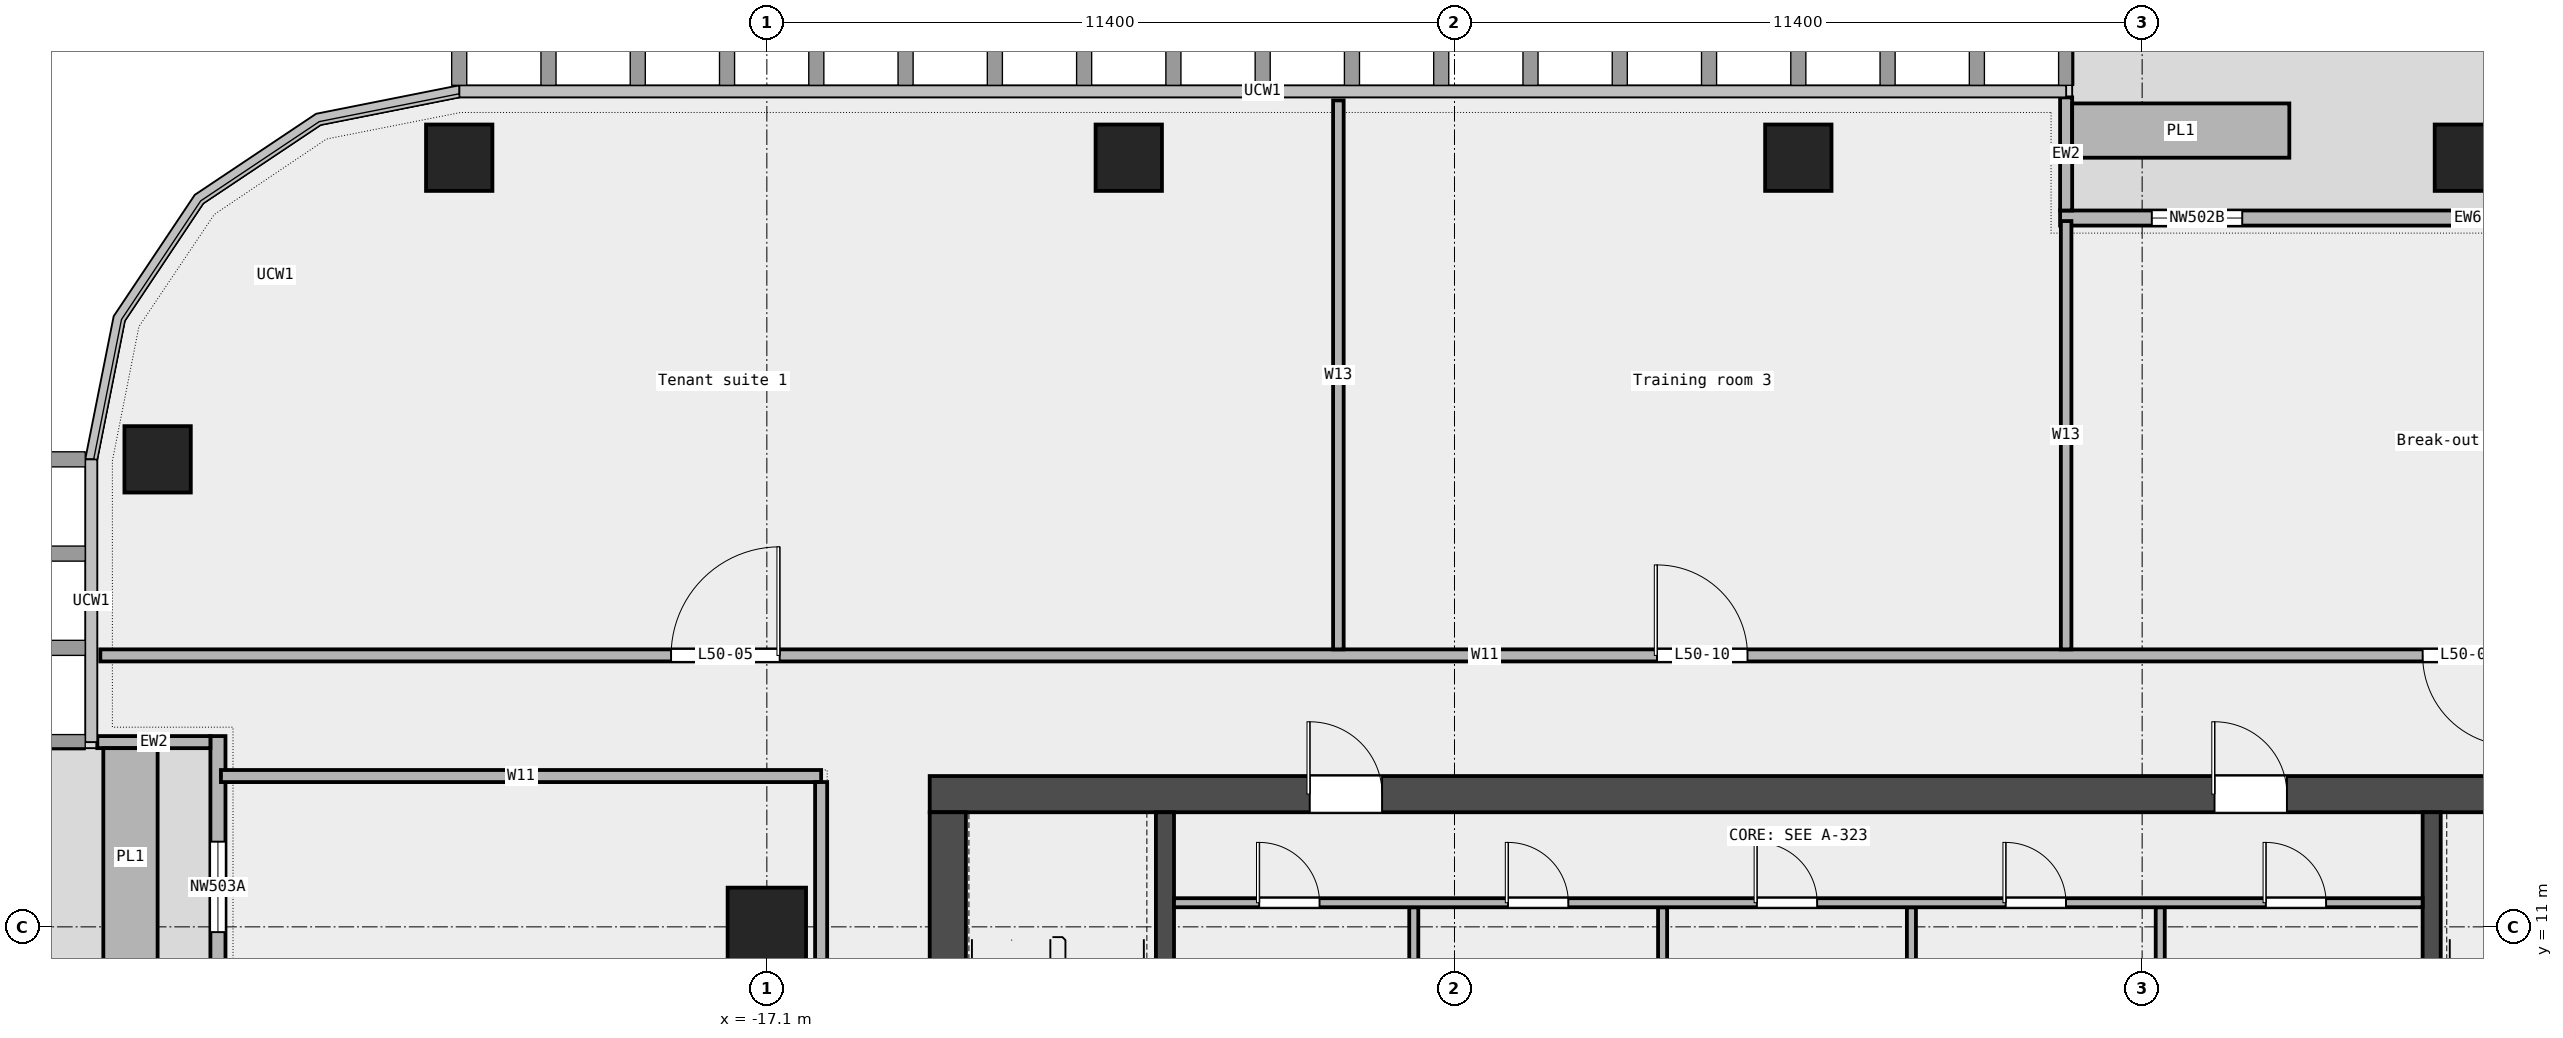
"""IFC4 building model, lengths in metres.
Left out: names, types, materials, properties, quantities, classifications, styles, units other than length and angle.
Written with IfcOpenShell. Run it as: python <this file> out.ifc"""

import sys

from ifc_helpers import new_model, si_unit, direction, frame, frame_2d, origin, origin_2d, place, context, subcontext, project, spatial, rectangle, extrude, element, fill, save


model = new_model("IFC4")
c1 = context("Model", 3, precision=1e-05, world=origin(), true_north=direction((0.0, 1.0)))
c2 = subcontext(c1, "Body", "Model", "MODEL_VIEW")
j1 = project(units=[si_unit("LENGTHUNIT", "METRE"), si_unit("PLANEANGLEUNIT", "RADIAN")], contexts=[c1])
p1 = place(None, origin())
s1 = spatial("IfcSite", under=j1, at=p1, CompositionType="ELEMENT")
p2 = place(p1, origin())
s2 = spatial("IfcBuilding", under=s1, at=p2, CompositionType="ELEMENT")
p3 = place(p2, frame((0.0, 0.0, 235.0)))
s3 = spatial("IfcBuildingStorey", under=s2, at=p3, CompositionType="ELEMENT", Elevation=235.0)
for number, where, z_axis, x_axis in (
    (1, (11.1, 23.75, 0.0), (0.0, 0.0, 1.0), (1.0, 0.0, 0.0)),
    (2, (0.0, 23.75, 0.0), (0.0, 0.0, 1.0), (1.0, 0.0, 0.0)),
    (3, (-11.1, 23.75, 0.0), (0.0, 0.0, 1.0), (1.0, 0.0, 0.0)),
    (4, (-22.2, 23.75, 0.0), (0.0, 0.0, 1.0), (1.0, 0.0, 0.0)),
    (5, (-27.2, 18.75, 0.0), (0.0, 0.0, 1.0), (1.0, 0.0, 0.0)),
):
    element("IfcColumn", number, at=place(p3, frame(where, z_axis=z_axis, x_axis=x_axis)), inside=s3, PredefinedType="COLUMN", context=c2, shape_type="SweptSolid", body=[
        extrude(rectangle(XDim=1.1, YDim=1.1, at=origin_2d()), origin(), (0.0, 0.0, 1.0), 3.6),
    ])
p4 = place(p3, frame((-17.1, 11.0, 0.0), z_axis=(0.0, 0.0, 1.0), x_axis=(1.0, 0.0, 0.0)))
e6 = element("IfcColumn", 6, at=p4, inside=s3, PredefinedType="COLUMN", context=c2, shape_type="SweptSolid", body=[
    extrude(rectangle(XDim=1.3, YDim=1.3, at=origin_2d()), origin(), (0.0, 0.0, 1.0), 3.6),
])
p5 = place(p3, frame((17.86, 22.75, 0.0), z_axis=(0.0, 0.0, 1.0), x_axis=(-1.0, 0.0, 0.0)))
e7 = element("IfcWall", 7, at=p5, inside=s3, PredefinedType="STANDARD", context=c2, shape_type="SweptSolid", body=[
    extrude(rectangle(XDim=13.52, YDim=0.25, at=frame_2d((6.76, 0.0))), origin(), (0.0, 0.0, 1.0), 3.6),
])
p6 = place(p5, frame((1.5, 0.0, 0.45)))
e8 = element("IfcOpeningElement", 8, at=p6, cuts=e7, PredefinedType="OPENING", context=c2, shape_type="SweptSolid", body=[
    extrude(rectangle(XDim=1.5, YDim=2.4, at=frame_2d((0.75, 1.2))), frame((0.0, 0.137, 0.0), z_axis=(0.0, -1.0, 0.0), x_axis=(1.0, 0.0, 0.0)), (0.0, 0.0, 1.0), 0.274),
])
p7 = place(p5, frame((4.0, 0.0, 0.0)))
e9 = element("IfcOpeningElement", 9, at=p7, cuts=e7, PredefinedType="OPENING", context=c2, shape_type="SweptSolid", body=[
    extrude(rectangle(XDim=1.8, YDim=2.4, at=frame_2d((0.9, 1.2))), frame((0.0, 0.137, 0.0), z_axis=(0.0, -1.0, 0.0), x_axis=(1.0, 0.0, 0.0)), (0.0, 0.0, 1.0), 0.274),
])
p8 = place(p5, frame((10.5, 0.0, 0.45)))
e10 = element("IfcOpeningElement", 10, at=p8, cuts=e7, PredefinedType="OPENING", context=c2, shape_type="SweptSolid", body=[
    extrude(rectangle(XDim=1.5, YDim=2.4, at=frame_2d((0.75, 1.2))), frame((0.0, 0.137, 0.0), z_axis=(0.0, -1.0, 0.0), x_axis=(1.0, 0.0, 0.0)), (0.0, 0.0, 1.0), 0.274),
])
p9 = place(p3, frame((4.44, 24.75, 0.0), z_axis=(0.0, 0.0, 1.0), x_axis=(0.0, -1.0, 0.0)))
e11 = element("IfcWall", 11, at=p9, inside=s3, PredefinedType="STANDARD", context=c2, shape_type="SweptSolid", body=[
    extrude(rectangle(XDim=1.875, YDim=0.2, at=frame_2d((0.938, 0.0))), origin(), (0.0, 0.0, 1.0), 3.6),
])
p10 = place(p3, frame((8.14, 24.2, 0.0), z_axis=(0.0, 0.0, 1.0), x_axis=(-1.0, 0.0, 0.0)))
e12 = element("IfcWall", 12, at=p10, inside=s3, PredefinedType="STANDARD", context=c2, shape_type="SweptSolid", body=[
    extrude(rectangle(XDim=3.6, YDim=0.9, at=frame_2d((1.8, 0.0))), origin(), (0.0, 0.0, 1.0), 0.7),
])
p11 = place(p3, frame((-26.2, 14.163, 0.0), z_axis=(0.0, 0.0, 1.0), x_axis=(0.0, -1.0, 0.0)))
e13 = element("IfcWall", 13, at=p11, inside=s3, PredefinedType="STANDARD", context=c2, shape_type="SweptSolid", body=[
    extrude(rectangle(XDim=14.263, YDim=0.25, at=frame_2d((7.131, 0.0))), origin(), (0.0, 0.0, 1.0), 3.6),
])
p12 = place(p11, frame((1.75, 0.0, 0.45)))
e14 = element("IfcOpeningElement", 14, at=p12, cuts=e13, PredefinedType="OPENING", context=c2, shape_type="SweptSolid", body=[
    extrude(rectangle(XDim=1.5, YDim=2.4, at=frame_2d((0.75, 1.2))), frame((0.0, 0.137, 0.0), z_axis=(0.0, -1.0, 0.0), x_axis=(1.0, 0.0, 0.0)), (0.0, 0.0, 1.0), 0.274),
])
p13 = place(p11, frame((5.0, 0.0, 0.0)))
e15 = element("IfcOpeningElement", 15, at=p13, cuts=e13, PredefinedType="OPENING", context=c2, shape_type="SweptSolid", body=[
    extrude(rectangle(XDim=1.8, YDim=2.4, at=frame_2d((0.9, 1.2))), frame((0.0, 0.137, 0.0), z_axis=(0.0, -1.0, 0.0), x_axis=(1.0, 0.0, 0.0)), (0.0, 0.0, 1.0), 0.274),
])
p14 = place(p11, frame((11.0, 0.0, 0.45)))
e16 = element("IfcOpeningElement", 16, at=p14, cuts=e13, PredefinedType="OPENING", context=c2, shape_type="SweptSolid", body=[
    extrude(rectangle(XDim=1.5, YDim=2.4, at=frame_2d((0.75, 1.2))), frame((0.0, 0.137, 0.0), z_axis=(0.0, -1.0, 0.0), x_axis=(1.0, 0.0, 0.0)), (0.0, 0.0, 1.0), 0.274),
])
p15 = place(p3, frame((-28.2, 14.062, 0.0), z_axis=(0.0, 0.0, 1.0), x_axis=(1.0, 0.0, 0.0)))
e17 = element("IfcWall", 17, at=p15, inside=s3, PredefinedType="STANDARD", context=c2, shape_type="SweptSolid", body=[
    extrude(rectangle(XDim=1.875, YDim=0.2, at=frame_2d((0.938, 0.0))), origin(), (0.0, 0.0, 1.0), 3.6),
])
p16 = place(p3, frame((-27.65, 13.962, 0.0), z_axis=(0.0, 0.0, 1.0), x_axis=(0.0, -1.0, 0.0)))
e18 = element("IfcWall", 18, at=p16, inside=s3, PredefinedType="STANDARD", context=c2, shape_type="SweptSolid", body=[
    extrude(rectangle(XDim=3.6, YDim=0.9, at=frame_2d((1.8, 0.0))), origin(), (0.0, 0.0, 1.0), 0.7),
])
p17 = place(p3, frame((-26.15, 13.5, 0.0), z_axis=(0.0, 0.0, 1.0), x_axis=(1.0, 0.0, 0.0)))
e19 = element("IfcWall", 19, at=p17, inside=s3, PredefinedType="PARTITIONING", context=c2, shape_type="SweptSolid", body=[
    extrude(rectangle(XDim=9.95, YDim=0.2, at=frame_2d((4.975, 0.0))), origin(), (0.0, 0.0, 1.0), 3.6),
])
p18 = place(p3, frame((-28.15, 15.5, 0.0), z_axis=(0.0, 0.0, 1.0), x_axis=(1.0, 0.0, 0.0)))
e20 = element("IfcWall", 20, at=p18, inside=s3, PredefinedType="PARTITIONING", context=c2, shape_type="SweptSolid", body=[
    extrude(rectangle(XDim=45.91, YDim=0.2, at=frame_2d((22.955, 0.0))), origin(), (0.0, 0.0, 1.0), 3.6),
])
p19 = place(p18, frame((38.5, 0.0, 0.0)))
e21 = element("IfcOpeningElement", 21, at=p19, cuts=e20, PredefinedType="OPENING", context=c2, shape_type="SweptSolid", body=[
    extrude(rectangle(XDim=1.5, YDim=2.1, at=frame_2d((0.75, 1.05))), frame((0.0, 0.112, 0.0), z_axis=(0.0, -1.0, 0.0), x_axis=(1.0, 0.0, 0.0)), (0.0, 0.0, 1.0), 0.224),
])
p20 = place(p18, frame((9.462, 0.0, 0.0)))
e22 = element("IfcOpeningElement", 22, at=p20, cuts=e20, PredefinedType="OPENING", context=c2, shape_type="SweptSolid", body=[
    extrude(rectangle(XDim=1.8, YDim=2.1, at=frame_2d((0.9, 1.05))), frame((0.0, 0.112, 0.0), z_axis=(0.0, -1.0, 0.0), x_axis=(1.0, 0.0, 0.0)), (0.0, 0.0, 1.0), 0.224),
])
p21 = place(p18, frame((25.808, 0.0, 0.0)))
e23 = element("IfcOpeningElement", 23, at=p21, cuts=e20, PredefinedType="OPENING", context=c2, shape_type="SweptSolid", body=[
    extrude(rectangle(XDim=1.5, YDim=2.1, at=frame_2d((0.75, 1.05))), frame((0.0, 0.112, 0.0), z_axis=(0.0, -1.0, 0.0), x_axis=(1.0, 0.0, 0.0)), (0.0, 0.0, 1.0), 0.224),
])
p22 = place(p3, frame((-16.2, -7.1, 0.0), z_axis=(0.0, 0.0, 1.0), x_axis=(0.0, 1.0, 0.0)))
e24 = element("IfcWall", 24, at=p22, inside=s3, PredefinedType="PARTITIONING", context=c2, shape_type="SweptSolid", body=[
    extrude(rectangle(XDim=20.5, YDim=0.2, at=frame_2d((10.25, 0.0))), origin(), (0.0, 0.0, 1.0), 3.6),
])
p23 = place(p22, frame((13.05, 0.0, 0.0)))
e25 = element("IfcOpeningElement", 25, at=p23, cuts=e24, PredefinedType="OPENING", context=c2, shape_type="SweptSolid", body=[
    extrude(rectangle(XDim=1.5, YDim=2.1, at=frame_2d((0.75, 1.05))), frame((0.0, 0.112, 0.0), z_axis=(0.0, -1.0, 0.0), x_axis=(1.0, 0.0, 0.0)), (0.0, 0.0, 1.0), 0.224),
])
p24 = place(p3, frame((-7.625, 15.6, 0.0), z_axis=(0.0, 0.0, 1.0), x_axis=(0.0, 1.0, 0.0)))
e26 = element("IfcWall", 26, at=p24, inside=s3, PredefinedType="PARTITIONING", context=c2, shape_type="SweptSolid", body=[
    extrude(rectangle(XDim=9.1, YDim=0.175, at=frame_2d((4.55, 0.0))), origin(), (0.0, 0.0, 1.0), 3.6),
])
p25 = place(p3, frame((4.44, 15.6, 0.0), z_axis=(0.0, 0.0, 1.0), x_axis=(0.0, 1.0, 0.0)))
e27 = element("IfcWall", 27, at=p25, inside=s3, PredefinedType="PARTITIONING", context=c2, shape_type="SweptSolid", body=[
    extrude(rectangle(XDim=7.1, YDim=0.175, at=frame_2d((3.55, 0.0))), origin(), (0.0, 0.0, 1.0), 3.6),
])
p26 = place(p3, frame((-14.4, 13.2, 0.0), z_axis=(0.0, 0.0, 1.0), x_axis=(1.0, 0.0, 0.0)))
e28 = element("IfcWall", 28, at=p26, inside=s3, PredefinedType="SHEAR", context=c2, shape_type="SweptSolid", body=[
    extrude(rectangle(XDim=28.8, YDim=0.6, at=frame_2d((14.4, 0.0))), origin(), (0.0, 0.0, 1.0), 3.7),
])
p27 = place(p26, frame((6.3, 0.0, 0.0)))
e29 = element("IfcOpeningElement", 29, at=p27, cuts=e28, PredefinedType="OPENING", context=c2, shape_type="SweptSolid", body=[
    extrude(rectangle(XDim=1.2, YDim=2.1, at=frame_2d((0.6, 1.05))), frame((0.0, 0.312, 0.0), z_axis=(0.0, -1.0, 0.0), x_axis=(1.0, 0.0, 0.0)), (0.0, 0.0, 1.0), 0.624),
])
p28 = place(p26, frame((21.3, 0.0, 0.0)))
e30 = element("IfcOpeningElement", 30, at=p28, cuts=e28, PredefinedType="OPENING", context=c2, shape_type="SweptSolid", body=[
    extrude(rectangle(XDim=1.2, YDim=2.1, at=frame_2d((0.6, 1.05))), frame((0.0, 0.312, 0.0), z_axis=(0.0, -1.0, 0.0), x_axis=(1.0, 0.0, 0.0)), (0.0, 0.0, 1.0), 0.624),
])
p29 = place(p3, frame((-14.1, -6.6, 0.0), z_axis=(0.0, 0.0, 1.0), x_axis=(0.0, 1.0, 0.0)))
e31 = element("IfcWall", 31, at=p29, inside=s3, PredefinedType="SHEAR", context=c2, shape_type="SweptSolid", body=[
    extrude(rectangle(XDim=19.5, YDim=0.6, at=frame_2d((9.75, 0.0))), origin(), (0.0, 0.0, 1.0), 3.7),
])
p30 = place(p29, frame((9.3, 0.0, 0.0)))
e32 = element("IfcOpeningElement", 32, at=p30, cuts=e31, PredefinedType="OPENING", context=c2, shape_type="SweptSolid", body=[
    extrude(rectangle(XDim=1.8, YDim=2.1, at=frame_2d((0.9, 1.05))), frame((0.0, 0.312, 0.0), z_axis=(0.0, -1.0, 0.0), x_axis=(1.0, 0.0, 0.0)), (0.0, 0.0, 1.0), 0.624),
])
for number, where, z_axis, x_axis in (
    (33, (-10.5, 5.25, 0.0), (0.0, 0.0, 1.0), (0.0, 1.0, 0.0)),
    (34, (10.5, 5.25, 0.0), (0.0, 0.0, 1.0), (0.0, 1.0, 0.0)),
):
    element("IfcWall", number, at=place(p3, frame(where, z_axis=z_axis, x_axis=x_axis)), inside=s3, PredefinedType="SHEAR", context=c2, shape_type="SweptSolid", body=[
        extrude(rectangle(XDim=7.65, YDim=0.3, at=frame_2d((3.825, 0.0))), origin(), (0.0, 0.0, 1.0), 3.7),
    ])
for number, where, z_axis, x_axis in (
    (35, (-6.375, 8.55, 0.0), (0.0, 0.0, 1.0), (0.0, 1.0, 0.0)),
    (36, (-2.25, 8.55, 0.0), (0.0, 0.0, 1.0), (0.0, 1.0, 0.0)),
    (37, (1.875, 8.55, 0.0), (0.0, 0.0, 1.0), (0.0, 1.0, 0.0)),
    (38, (6.0, 8.55, 0.0), (0.0, 0.0, 1.0), (0.0, 1.0, 0.0)),
):
    element("IfcWall", number, at=place(p3, frame(where, z_axis=z_axis, x_axis=x_axis)), inside=s3, PredefinedType="PARTITIONING", context=c2, shape_type="SweptSolid", body=[
        extrude(rectangle(XDim=2.775, YDim=0.15, at=frame_2d((1.387, 0.0))), origin(), (0.0, 0.0, 1.0), 3.7),
    ])
p31 = place(p3, frame((-10.35, 11.4, 0.0), z_axis=(0.0, 0.0, 1.0), x_axis=(1.0, 0.0, 0.0)))
e39 = element("IfcWall", 39, at=p31, inside=s3, PredefinedType="PARTITIONING", context=c2, shape_type="SweptSolid", body=[
    extrude(rectangle(XDim=20.7, YDim=0.15, at=frame_2d((10.35, 0.0))), origin(), (0.0, 0.0, 1.0), 3.7),
])
p32 = place(p31, frame((1.413, 0.0, 0.0)))
e40 = element("IfcOpeningElement", 40, at=p32, cuts=e39, PredefinedType="OPENING", context=c2, shape_type="SweptSolid", body=[
    extrude(rectangle(XDim=1.0, YDim=2.1, at=frame_2d((0.5, 1.05))), frame((0.0, 0.087, 0.0), z_axis=(0.0, -1.0, 0.0), x_axis=(1.0, 0.0, 0.0)), (0.0, 0.0, 1.0), 0.174),
])
p33 = place(p31, frame((5.538, 0.0, 0.0)))
e41 = element("IfcOpeningElement", 41, at=p33, cuts=e39, PredefinedType="OPENING", context=c2, shape_type="SweptSolid", body=[
    extrude(rectangle(XDim=1.0, YDim=2.1, at=frame_2d((0.5, 1.05))), frame((0.0, 0.087, 0.0), z_axis=(0.0, -1.0, 0.0), x_axis=(1.0, 0.0, 0.0)), (0.0, 0.0, 1.0), 0.174),
])
p34 = place(p31, frame((9.663, 0.0, 0.0)))
e42 = element("IfcOpeningElement", 42, at=p34, cuts=e39, PredefinedType="OPENING", context=c2, shape_type="SweptSolid", body=[
    extrude(rectangle(XDim=1.0, YDim=2.1, at=frame_2d((0.5, 1.05))), frame((0.0, 0.087, 0.0), z_axis=(0.0, -1.0, 0.0), x_axis=(1.0, 0.0, 0.0)), (0.0, 0.0, 1.0), 0.174),
])
p35 = place(p31, frame((13.788, 0.0, 0.0)))
e43 = element("IfcOpeningElement", 43, at=p35, cuts=e39, PredefinedType="OPENING", context=c2, shape_type="SweptSolid", body=[
    extrude(rectangle(XDim=1.0, YDim=2.1, at=frame_2d((0.5, 1.05))), frame((0.0, 0.087, 0.0), z_axis=(0.0, -1.0, 0.0), x_axis=(1.0, 0.0, 0.0)), (0.0, 0.0, 1.0), 0.174),
])
p36 = place(p31, frame((18.1, 0.0, 0.0)))
e44 = element("IfcOpeningElement", 44, at=p36, cuts=e39, PredefinedType="OPENING", context=c2, shape_type="SweptSolid", body=[
    extrude(rectangle(XDim=1.0, YDim=2.1, at=frame_2d((0.5, 1.05))), frame((0.0, 0.087, 0.0), z_axis=(0.0, -1.0, 0.0), x_axis=(1.0, 0.0, 0.0)), (0.0, 0.0, 1.0), 0.174),
])
p37 = place(p8, origin())
e45 = element("IfcWindow", 45, at=p37, inside=s3, PartitioningType="SINGLE_PANEL", PredefinedType="WINDOW", context=c2, shape_type="SweptSolid", body=[
    extrude(rectangle(XDim=1.5, YDim=2.4, at=frame_2d((0.75, 1.2))), frame((0.0, 0.03, 0.0), z_axis=(0.0, -1.0, 0.0), x_axis=(1.0, 0.0, 0.0)), (0.0, 0.0, 1.0), 0.06),
])
fill(e10, e45)
p38 = place(p12, origin())
e46 = element("IfcWindow", 46, at=p38, inside=s3, PartitioningType="SINGLE_PANEL", PredefinedType="WINDOW", context=c2, shape_type="SweptSolid", body=[
    extrude(rectangle(XDim=1.5, YDim=2.4, at=frame_2d((0.75, 1.2))), frame((0.0, 0.03, 0.0), z_axis=(0.0, -1.0, 0.0), x_axis=(1.0, 0.0, 0.0)), (0.0, 0.0, 1.0), 0.06),
])
fill(e14, e46)
p39 = place(p19, origin())
e47 = element("IfcDoor", 47, at=p39, inside=s3, OperationType="DOUBLE_DOOR_SINGLE_SWING", PredefinedType="DOOR", context=c2, shape_type="SweptSolid", body=[
    extrude(rectangle(XDim=1.5, YDim=2.1, at=frame_2d((0.75, 1.05))), frame((0.0, 0.025, 0.0), z_axis=(0.0, -1.0, 0.0), x_axis=(1.0, 0.0, 0.0)), (0.0, 0.0, 1.0), 0.05),
])
fill(e21, e47)
p40 = place(p20, origin())
e48 = element("IfcDoor", 48, at=p40, inside=s3, OperationType="DOUBLE_DOOR_SINGLE_SWING", PredefinedType="DOOR", context=c2, shape_type="SweptSolid", body=[
    extrude(rectangle(XDim=1.8, YDim=2.1, at=frame_2d((0.9, 1.05))), frame((0.0, 0.025, 0.0), z_axis=(0.0, -1.0, 0.0), x_axis=(1.0, 0.0, 0.0)), (0.0, 0.0, 1.0), 0.05),
])
fill(e22, e48)
p41 = place(p21, origin())
e49 = element("IfcDoor", 49, at=p41, inside=s3, OperationType="DOUBLE_DOOR_SINGLE_SWING", PredefinedType="DOOR", context=c2, shape_type="SweptSolid", body=[
    extrude(rectangle(XDim=1.5, YDim=2.1, at=frame_2d((0.75, 1.05))), frame((0.0, 0.025, 0.0), z_axis=(0.0, -1.0, 0.0), x_axis=(1.0, 0.0, 0.0)), (0.0, 0.0, 1.0), 0.05),
])
fill(e23, e49)
p42 = place(p32, origin())
e50 = element("IfcDoor", 50, at=p42, inside=s3, OperationType="SINGLE_SWING_LEFT", PredefinedType="DOOR", context=c2, shape_type="SweptSolid", body=[
    extrude(rectangle(XDim=1.0, YDim=2.1, at=frame_2d((0.5, 1.05))), frame((0.0, 0.025, 0.0), z_axis=(0.0, -1.0, 0.0), x_axis=(1.0, 0.0, 0.0)), (0.0, 0.0, 1.0), 0.05),
])
fill(e40, e50)
p43 = place(p33, origin())
e51 = element("IfcDoor", 51, at=p43, inside=s3, OperationType="SINGLE_SWING_LEFT", PredefinedType="DOOR", context=c2, shape_type="SweptSolid", body=[
    extrude(rectangle(XDim=1.0, YDim=2.1, at=frame_2d((0.5, 1.05))), frame((0.0, 0.025, 0.0), z_axis=(0.0, -1.0, 0.0), x_axis=(1.0, 0.0, 0.0)), (0.0, 0.0, 1.0), 0.05),
])
fill(e41, e51)
p44 = place(p34, origin())
e52 = element("IfcDoor", 52, at=p44, inside=s3, OperationType="SINGLE_SWING_LEFT", PredefinedType="DOOR", context=c2, shape_type="SweptSolid", body=[
    extrude(rectangle(XDim=1.0, YDim=2.1, at=frame_2d((0.5, 1.05))), frame((0.0, 0.025, 0.0), z_axis=(0.0, -1.0, 0.0), x_axis=(1.0, 0.0, 0.0)), (0.0, 0.0, 1.0), 0.05),
])
fill(e42, e52)
p45 = place(p35, origin())
e53 = element("IfcDoor", 53, at=p45, inside=s3, OperationType="SINGLE_SWING_LEFT", PredefinedType="DOOR", context=c2, shape_type="SweptSolid", body=[
    extrude(rectangle(XDim=1.0, YDim=2.1, at=frame_2d((0.5, 1.05))), frame((0.0, 0.025, 0.0), z_axis=(0.0, -1.0, 0.0), x_axis=(1.0, 0.0, 0.0)), (0.0, 0.0, 1.0), 0.05),
])
fill(e43, e53)
p46 = place(p36, origin())
e54 = element("IfcDoor", 54, at=p46, inside=s3, OperationType="SINGLE_SWING_LEFT", PredefinedType="DOOR", context=c2, shape_type="SweptSolid", body=[
    extrude(rectangle(XDim=1.0, YDim=2.1, at=frame_2d((0.5, 1.05))), frame((0.0, 0.025, 0.0), z_axis=(0.0, -1.0, 0.0), x_axis=(1.0, 0.0, 0.0)), (0.0, 0.0, 1.0), 0.05),
])
fill(e44, e54)
p47 = place(p27, origin())
e55 = element("IfcDoor", 55, at=p47, inside=s3, OperationType="SINGLE_SWING_LEFT", PredefinedType="DOOR", context=c2, shape_type="SweptSolid", body=[
    extrude(rectangle(XDim=1.2, YDim=2.1, at=frame_2d((0.6, 1.05))), frame((0.0, 0.025, 0.0), z_axis=(0.0, -1.0, 0.0), x_axis=(1.0, 0.0, 0.0)), (0.0, 0.0, 1.0), 0.05),
])
fill(e29, e55)
p48 = place(p28, origin())
e56 = element("IfcDoor", 56, at=p48, inside=s3, OperationType="SINGLE_SWING_RIGHT", PredefinedType="DOOR", context=c2, shape_type="SweptSolid", body=[
    extrude(rectangle(XDim=1.2, YDim=2.1, at=frame_2d((0.6, 1.05))), frame((0.0, 0.025, 0.0), z_axis=(0.0, -1.0, 0.0), x_axis=(1.0, 0.0, 0.0)), (0.0, 0.0, 1.0), 0.05),
])
fill(e30, e56)
save(model, sys.argv[1])
